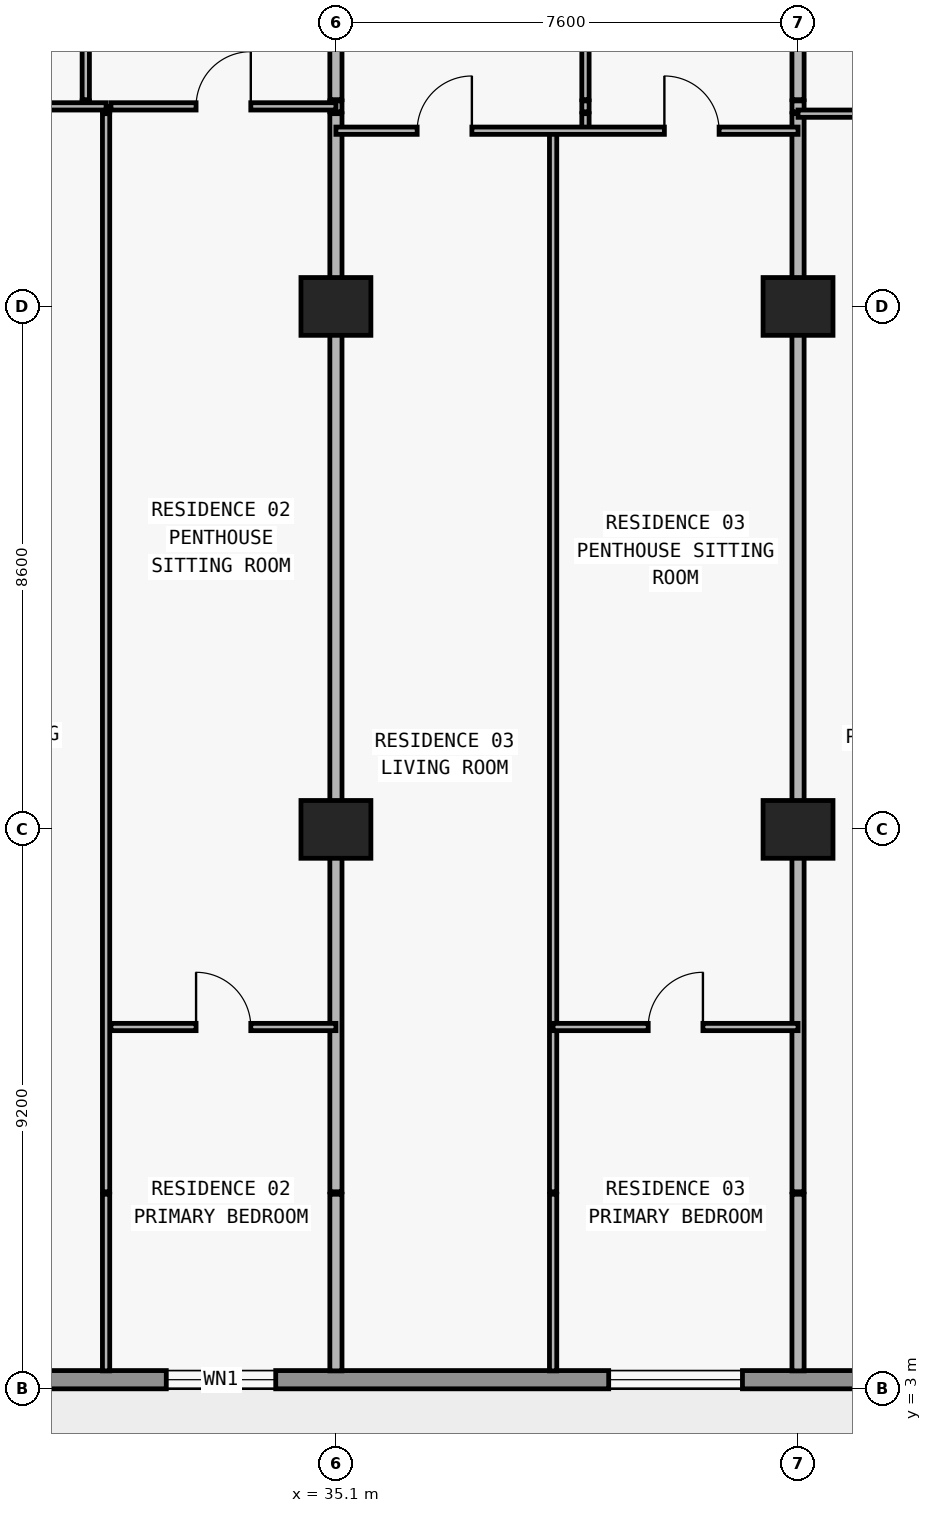
"""IFC4 building model, lengths in metres.
Left out: names, types, materials, properties, quantities, classifications, styles, units other than length and angle.
Written with IfcOpenShell. Run it as: python <this file> out.ifc"""

import sys

from ifc_helpers import new_model, si_unit, direction, frame, frame_2d, origin, origin_2d, place, context, subcontext, project, spatial, rectangle, extrude, element, fill, save


model = new_model("IFC4")
c1 = context("Model", 3, precision=1e-05, world=origin(), true_north=direction((0.0, 1.0)))
c2 = subcontext(c1, "Body", "Model", "MODEL_VIEW")
j1 = project(units=[si_unit("LENGTHUNIT", "METRE"), si_unit("PLANEANGLEUNIT", "RADIAN")], contexts=[c1])
p1 = place(None, origin())
s1 = spatial("IfcSite", under=j1, at=p1, CompositionType="ELEMENT")
p2 = place(p1, origin())
s2 = spatial("IfcBuilding", under=s1, at=p2, CompositionType="ELEMENT")
p3 = place(p2, frame((0.0, 0.0, 43.2)))
s3 = spatial("IfcBuildingStorey", under=s2, at=p3, CompositionType="ELEMENT", Elevation=43.2)
for number, where, z_axis, x_axis in (
    (1, (35.1, 12.2, 0.0), (0.0, 0.0, 1.0), (1.0, 0.0, 0.0)),
    (2, (42.7, 12.2, 0.0), (0.0, 0.0, 1.0), (1.0, 0.0, 0.0)),
    (3, (35.1, 20.8, 0.0), (0.0, 0.0, 1.0), (1.0, 0.0, 0.0)),
    (4, (42.7, 20.8, 0.0), (0.0, 0.0, 1.0), (1.0, 0.0, 0.0)),
):
    element("IfcColumn", number, at=place(p3, frame(where, z_axis=z_axis, x_axis=x_axis)), inside=s3, PredefinedType="COLUMN", context=c2, shape_type="SweptSolid", body=[
        extrude(rectangle(XDim=1.15, YDim=0.95, at=origin_2d()), origin(), (0.0, 0.0, 1.0), 3.05),
    ])
p4 = place(p3, frame((72.7, 3.15, 0.0), z_axis=(0.0, 0.0, 1.0), x_axis=(-1.0, 0.0, 0.0)))
e5 = element("IfcWall", 5, at=p4, inside=s3, PredefinedType="STANDARD", context=c2, shape_type="SweptSolid", body=[
    extrude(rectangle(XDim=67.6, YDim=0.3, at=frame_2d((33.8, 0.0))), origin(), (0.0, 0.0, 1.0), 3.05),
])
p5 = place(p4, frame((59.89, 0.0, 0.0)))
e6 = element("IfcOpeningElement", 6, at=p5, cuts=e5, PredefinedType="OPENING", context=c2, shape_type="SweptSolid", body=[
    extrude(rectangle(XDim=2.0, YDim=2.3, at=frame_2d((1.0, 1.15))), frame((0.0, 0.16, 0.0), z_axis=(0.0, -1.0, 0.0), x_axis=(1.0, 0.0, 0.0)), (0.0, 0.0, 1.0), 0.32),
])
p6 = place(p4, frame((55.21, 0.0, 0.65)))
e7 = element("IfcOpeningElement", 7, at=p6, cuts=e5, PredefinedType="OPENING", context=c2, shape_type="SweptSolid", body=[
    extrude(rectangle(XDim=2.6, YDim=1.85, at=frame_2d((1.3, 0.925))), frame((0.0, 0.16, 0.0), z_axis=(0.0, -1.0, 0.0), x_axis=(1.0, 0.0, 0.0)), (0.0, 0.0, 1.0), 0.32),
])
p7 = place(p4, frame((49.1, 0.0, 0.85)))
e8 = element("IfcOpeningElement", 8, at=p7, cuts=e5, PredefinedType="OPENING", context=c2, shape_type="SweptSolid", body=[
    extrude(rectangle(XDim=2.2, YDim=1.55, at=frame_2d((1.1, 0.775))), frame((0.0, 0.16, 0.0), z_axis=(0.0, -1.0, 0.0), x_axis=(1.0, 0.0, 0.0)), (0.0, 0.0, 1.0), 0.32),
])
p8 = place(p4, frame((42.69, 0.0, 0.0)))
e9 = element("IfcOpeningElement", 9, at=p8, cuts=e5, PredefinedType="OPENING", context=c2, shape_type="SweptSolid", body=[
    extrude(rectangle(XDim=2.0, YDim=2.3, at=frame_2d((1.0, 1.15))), frame((0.0, 0.16, 0.0), z_axis=(0.0, -1.0, 0.0), x_axis=(1.0, 0.0, 0.0)), (0.0, 0.0, 1.0), 0.32),
])
p9 = place(p4, frame((38.59, 0.0, 0.85)))
e10 = element("IfcOpeningElement", 10, at=p9, cuts=e5, PredefinedType="OPENING", context=c2, shape_type="SweptSolid", body=[
    extrude(rectangle(XDim=1.8, YDim=1.55, at=frame_2d((0.9, 0.775))), frame((0.0, 0.16, 0.0), z_axis=(0.0, -1.0, 0.0), x_axis=(1.0, 0.0, 0.0)), (0.0, 0.0, 1.0), 0.32),
])
p10 = place(p4, frame((30.914, 0.0, 0.85)))
e11 = element("IfcOpeningElement", 11, at=p10, cuts=e5, PredefinedType="OPENING", context=c2, shape_type="SweptSolid", body=[
    extrude(rectangle(XDim=2.2, YDim=1.55, at=frame_2d((1.1, 0.775))), frame((0.0, 0.16, 0.0), z_axis=(0.0, -1.0, 0.0), x_axis=(1.0, 0.0, 0.0)), (0.0, 0.0, 1.0), 0.32),
])
p11 = place(p4, frame((26.69, 0.0, 0.0)))
e12 = element("IfcOpeningElement", 12, at=p11, cuts=e5, PredefinedType="OPENING", context=c2, shape_type="SweptSolid", body=[
    extrude(rectangle(XDim=2.0, YDim=2.3, at=frame_2d((1.0, 1.15))), frame((0.0, 0.16, 0.0), z_axis=(0.0, -1.0, 0.0), x_axis=(1.0, 0.0, 0.0)), (0.0, 0.0, 1.0), 0.32),
])
p12 = place(p4, frame((22.59, 0.0, 0.85)))
e13 = element("IfcOpeningElement", 13, at=p12, cuts=e5, PredefinedType="OPENING", context=c2, shape_type="SweptSolid", body=[
    extrude(rectangle(XDim=1.8, YDim=1.55, at=frame_2d((0.9, 0.775))), frame((0.0, 0.16, 0.0), z_axis=(0.0, -1.0, 0.0), x_axis=(1.0, 0.0, 0.0)), (0.0, 0.0, 1.0), 0.32),
])
p13 = place(p4, frame((18.69, 0.0, 0.0)))
e14 = element("IfcOpeningElement", 14, at=p13, cuts=e5, PredefinedType="OPENING", context=c2, shape_type="SweptSolid", body=[
    extrude(rectangle(XDim=2.0, YDim=2.3, at=frame_2d((1.0, 1.15))), frame((0.0, 0.16, 0.0), z_axis=(0.0, -1.0, 0.0), x_axis=(1.0, 0.0, 0.0)), (0.0, 0.0, 1.0), 0.32),
])
p14 = place(p4, frame((14.01, 0.0, 0.65)))
e15 = element("IfcOpeningElement", 15, at=p14, cuts=e5, PredefinedType="OPENING", context=c2, shape_type="SweptSolid", body=[
    extrude(rectangle(XDim=2.6, YDim=1.85, at=frame_2d((1.3, 0.925))), frame((0.0, 0.16, 0.0), z_axis=(0.0, -1.0, 0.0), x_axis=(1.0, 0.0, 0.0)), (0.0, 0.0, 1.0), 0.32),
])
p15 = place(p4, frame((7.9, 0.0, 0.85)))
e16 = element("IfcOpeningElement", 16, at=p15, cuts=e5, PredefinedType="OPENING", context=c2, shape_type="SweptSolid", body=[
    extrude(rectangle(XDim=2.2, YDim=1.55, at=frame_2d((1.1, 0.775))), frame((0.0, 0.16, 0.0), z_axis=(0.0, -1.0, 0.0), x_axis=(1.0, 0.0, 0.0)), (0.0, 0.0, 1.0), 0.32),
])
p16 = place(p3, frame((30.986, 24.09, 0.0), z_axis=(0.0, 0.0, 1.0), x_axis=(0.0, 1.0, 0.0)))
e17 = element("IfcWall", 17, at=p16, inside=s3, PredefinedType="PARTITIONING", context=c2, shape_type="SweptSolid", body=[
    extrude(rectangle(XDim=0.09, YDim=0.12, at=frame_2d((0.045, 0.0))), origin(), (0.0, 0.0, 1.0), 3.05),
])
p17 = place(p3, frame((30.986, 24.2, 0.0), z_axis=(0.0, 0.0, 1.0), x_axis=(0.0, 1.0, 0.0)))
e18 = element("IfcWall", 18, at=p17, inside=s3, PredefinedType="PARTITIONING", context=c2, shape_type="SweptSolid", body=[
    extrude(rectangle(XDim=4.38, YDim=0.12, at=frame_2d((2.19, 0.0))), origin(), (0.0, 0.0, 1.0), 3.05),
])
p18 = place(p17, frame((1.74, 0.0, 0.0)))
e19 = element("IfcOpeningElement", 19, at=p18, cuts=e18, PredefinedType="OPENING", context=c2, shape_type="SweptSolid", body=[
    extrude(rectangle(XDim=0.9, YDim=2.15, at=frame_2d((0.45, 1.075))), frame((0.0, 0.07, 0.0), z_axis=(0.0, -1.0, 0.0), x_axis=(1.0, 0.0, 0.0)), (0.0, 0.0, 1.0), 0.14),
])
p19 = place(p3, frame((31.32, 3.295, 0.0), z_axis=(0.0, 0.0, 1.0), x_axis=(0.0, 1.0, 0.0)))
e20 = element("IfcWall", 20, at=p19, inside=s3, PredefinedType="PARTITIONING", context=c2, shape_type="SweptSolid", body=[
    extrude(rectangle(XDim=2.905, YDim=0.12, at=frame_2d((1.453, 0.0))), origin(), (0.0, 0.0, 1.0), 3.05),
])
p20 = place(p3, frame((31.32, 6.24, 0.0), z_axis=(0.0, 0.0, 1.0), x_axis=(0.0, 1.0, 0.0)))
e21 = element("IfcWall", 21, at=p20, inside=s3, PredefinedType="PARTITIONING", context=c2, shape_type="SweptSolid", body=[
    extrude(rectangle(XDim=17.73, YDim=0.12, at=frame_2d((8.865, 0.0))), origin(), (0.0, 0.0, 1.0), 3.05),
])
p21 = place(p3, frame((31.32, 24.0, 0.0), z_axis=(0.0, 0.0, 1.0), x_axis=(0.0, 1.0, 0.0)))
e22 = element("IfcWall", 22, at=p21, inside=s3, PredefinedType="PARTITIONING", context=c2, shape_type="SweptSolid", body=[
    extrude(rectangle(XDim=0.09, YDim=0.12, at=frame_2d((0.045, 0.0))), origin(), (0.0, 0.0, 1.0), 3.05),
])
p22 = place(p3, frame((35.1, 3.295, 0.0), z_axis=(0.0, 0.0, 1.0), x_axis=(0.0, 1.0, 0.0)))
e23 = element("IfcWall", 23, at=p22, inside=s3, PredefinedType="PARTITIONING", context=c2, shape_type="SweptSolid", body=[
    extrude(rectangle(XDim=2.905, YDim=0.2, at=frame_2d((1.453, 0.0))), origin(), (0.0, 0.0, 1.0), 3.05),
])
p23 = place(p3, frame((35.1, 6.24, 0.0), z_axis=(0.0, 0.0, 1.0), x_axis=(0.0, 1.0, 0.0)))
e24 = element("IfcWall", 24, at=p23, inside=s3, PredefinedType="PARTITIONING", context=c2, shape_type="SweptSolid", body=[
    extrude(rectangle(XDim=17.73, YDim=0.2, at=frame_2d((8.865, 0.0))), origin(), (0.0, 0.0, 1.0), 2.11),
])
p24 = place(p3, frame((35.1, 24.0, 0.0), z_axis=(0.0, 0.0, 1.0), x_axis=(0.0, 1.0, 0.0)))
e25 = element("IfcWall", 25, at=p24, inside=s3, PredefinedType="PARTITIONING", context=c2, shape_type="SweptSolid", body=[
    extrude(rectangle(XDim=0.18, YDim=0.2, at=frame_2d((0.09, 0.0))), origin(), (0.0, 0.0, 1.0), 2.11),
])
p25 = place(p3, frame((35.1, 24.2, 0.0), z_axis=(0.0, 0.0, 1.0), x_axis=(0.0, 1.0, 0.0)))
e26 = element("IfcWall", 26, at=p25, inside=s3, PredefinedType="PARTITIONING", context=c2, shape_type="SweptSolid", body=[
    extrude(rectangle(XDim=4.38, YDim=0.2, at=frame_2d((2.19, 0.0))), origin(), (0.0, 0.0, 1.0), 2.11),
])
p26 = place(p3, frame((38.672, 3.295, 0.0), z_axis=(0.0, 0.0, 1.0), x_axis=(0.0, 1.0, 0.0)))
e27 = element("IfcWall", 27, at=p26, inside=s3, PredefinedType="PARTITIONING", context=c2, shape_type="SweptSolid", body=[
    extrude(rectangle(XDim=2.905, YDim=0.12, at=frame_2d((1.453, 0.0))), origin(), (0.0, 0.0, 1.0), 3.05),
])
p27 = place(p3, frame((38.672, 6.24, 0.0), z_axis=(0.0, 0.0, 1.0), x_axis=(0.0, 1.0, 0.0)))
e28 = element("IfcWall", 28, at=p27, inside=s3, PredefinedType="PARTITIONING", context=c2, shape_type="SweptSolid", body=[
    extrude(rectangle(XDim=17.45, YDim=0.12, at=frame_2d((8.725, 0.0))), origin(), (0.0, 0.0, 1.0), 3.05),
])
p28 = place(p3, frame((39.204, 23.69, 0.0), z_axis=(0.0, 0.0, 1.0), x_axis=(0.0, 1.0, 0.0)))
e29 = element("IfcWall", 29, at=p28, inside=s3, PredefinedType="PARTITIONING", context=c2, shape_type="SweptSolid", body=[
    extrude(rectangle(XDim=0.28, YDim=0.12, at=frame_2d((0.14, 0.0))), origin(), (0.0, 0.0, 1.0), 3.05),
])
p29 = place(p3, frame((39.204, 24.0, 0.0), z_axis=(0.0, 0.0, 1.0), x_axis=(0.0, 1.0, 0.0)))
e30 = element("IfcWall", 30, at=p29, inside=s3, PredefinedType="PARTITIONING", context=c2, shape_type="SweptSolid", body=[
    extrude(rectangle(XDim=0.18, YDim=0.12, at=frame_2d((0.09, 0.0))), origin(), (0.0, 0.0, 1.0), 3.05),
])
p30 = place(p3, frame((39.204, 24.2, 0.0), z_axis=(0.0, 0.0, 1.0), x_axis=(0.0, 1.0, 0.0)))
e31 = element("IfcWall", 31, at=p30, inside=s3, PredefinedType="PARTITIONING", context=c2, shape_type="SweptSolid", body=[
    extrude(rectangle(XDim=4.38, YDim=0.12, at=frame_2d((2.19, 0.0))), origin(), (0.0, 0.0, 1.0), 3.05),
])
p31 = place(p30, frame((1.74, 0.0, 0.0)))
e32 = element("IfcOpeningElement", 32, at=p31, cuts=e31, PredefinedType="OPENING", context=c2, shape_type="SweptSolid", body=[
    extrude(rectangle(XDim=0.9, YDim=2.15, at=frame_2d((0.45, 1.075))), frame((0.0, 0.07, 0.0), z_axis=(0.0, -1.0, 0.0), x_axis=(1.0, 0.0, 0.0)), (0.0, 0.0, 1.0), 0.14),
])
p32 = place(p3, frame((42.7, 3.295, 0.0), z_axis=(0.0, 0.0, 1.0), x_axis=(0.0, 1.0, 0.0)))
e33 = element("IfcWall", 33, at=p32, inside=s3, PredefinedType="PARTITIONING", context=c2, shape_type="SweptSolid", body=[
    extrude(rectangle(XDim=2.905, YDim=0.2, at=frame_2d((1.453, 0.0))), origin(), (0.0, 0.0, 1.0), 3.05),
])
p33 = place(p3, frame((42.7, 6.24, 0.0), z_axis=(0.0, 0.0, 1.0), x_axis=(0.0, 1.0, 0.0)))
e34 = element("IfcWall", 34, at=p33, inside=s3, PredefinedType="PARTITIONING", context=c2, shape_type="SweptSolid", body=[
    extrude(rectangle(XDim=17.73, YDim=0.2, at=frame_2d((8.865, 0.0))), origin(), (0.0, 0.0, 1.0), 2.11),
])
p34 = place(p3, frame((42.7, 24.0, 0.0), z_axis=(0.0, 0.0, 1.0), x_axis=(0.0, 1.0, 0.0)))
e35 = element("IfcWall", 35, at=p34, inside=s3, PredefinedType="PARTITIONING", context=c2, shape_type="SweptSolid", body=[
    extrude(rectangle(XDim=0.18, YDim=0.2, at=frame_2d((0.09, 0.0))), origin(), (0.0, 0.0, 1.0), 2.11),
])
p35 = place(p3, frame((42.7, 24.2, 0.0), z_axis=(0.0, 0.0, 1.0), x_axis=(0.0, 1.0, 0.0)))
e36 = element("IfcWall", 36, at=p35, inside=s3, PredefinedType="PARTITIONING", context=c2, shape_type="SweptSolid", body=[
    extrude(rectangle(XDim=4.38, YDim=0.2, at=frame_2d((2.19, 0.0))), origin(), (0.0, 0.0, 1.0), 2.11),
])
p36 = place(p3, frame((31.4, 8.95, 0.0), z_axis=(0.0, 0.0, 1.0), x_axis=(1.0, 0.0, 0.0)))
e37 = element("IfcWall", 37, at=p36, inside=s3, PredefinedType="PARTITIONING", context=c2, shape_type="SweptSolid", body=[
    extrude(rectangle(XDim=3.7, YDim=0.12, at=frame_2d((1.85, 0.0))), origin(), (0.0, 0.0, 1.0), 3.05),
])
p37 = place(p36, frame((1.4, 0.0, 0.0)))
e38 = element("IfcOpeningElement", 38, at=p37, cuts=e37, PredefinedType="OPENING", context=c2, shape_type="SweptSolid", body=[
    extrude(rectangle(XDim=0.9, YDim=2.15, at=frame_2d((0.45, 1.075))), frame((0.0, 0.07, 0.0), z_axis=(0.0, -1.0, 0.0), x_axis=(1.0, 0.0, 0.0)), (0.0, 0.0, 1.0), 0.14),
])
p38 = place(p3, frame((38.672, 8.95, 0.0), z_axis=(0.0, 0.0, 1.0), x_axis=(1.0, 0.0, 0.0)))
e39 = element("IfcWall", 39, at=p38, inside=s3, PredefinedType="PARTITIONING", context=c2, shape_type="SweptSolid", body=[
    extrude(rectangle(XDim=4.028, YDim=0.12, at=frame_2d((2.014, 0.0))), origin(), (0.0, 0.0, 1.0), 3.05),
])
p39 = place(p38, frame((1.564, 0.0, 0.0)))
e40 = element("IfcOpeningElement", 40, at=p39, cuts=e39, PredefinedType="OPENING", context=c2, shape_type="SweptSolid", body=[
    extrude(rectangle(XDim=0.9, YDim=2.15, at=frame_2d((0.45, 1.075))), frame((0.0, 0.07, 0.0), z_axis=(0.0, -1.0, 0.0), x_axis=(1.0, 0.0, 0.0)), (0.0, 0.0, 1.0), 0.14),
])
p40 = place(p3, frame((35.1, 23.69, 0.0), z_axis=(0.0, 0.0, 1.0), x_axis=(1.0, 0.0, 0.0)))
e41 = element("IfcWall", 41, at=p40, inside=s3, PredefinedType="PARTITIONING", context=c2, shape_type="SweptSolid", body=[
    extrude(rectangle(XDim=7.6, YDim=0.12, at=frame_2d((3.8, 0.0))), origin(), (0.0, 0.0, 1.0), 3.05),
])
p41 = place(p40, frame((1.336, 0.0, 0.0)))
e42 = element("IfcOpeningElement", 42, at=p41, cuts=e41, PredefinedType="OPENING", context=c2, shape_type="SweptSolid", body=[
    extrude(rectangle(XDim=0.9, YDim=2.15, at=frame_2d((0.45, 1.075))), frame((0.0, 0.07, 0.0), z_axis=(0.0, -1.0, 0.0), x_axis=(1.0, 0.0, 0.0)), (0.0, 0.0, 1.0), 0.14),
])
p42 = place(p40, frame((5.402, 0.0, 0.0)))
e43 = element("IfcOpeningElement", 43, at=p42, cuts=e41, PredefinedType="OPENING", context=c2, shape_type="SweptSolid", body=[
    extrude(rectangle(XDim=0.9, YDim=2.15, at=frame_2d((0.45, 1.075))), frame((0.0, 0.07, 0.0), z_axis=(0.0, -1.0, 0.0), x_axis=(1.0, 0.0, 0.0)), (0.0, 0.0, 1.0), 0.14),
])
p43 = place(p3, frame((42.7, 23.97, 0.0), z_axis=(0.0, 0.0, 1.0), x_axis=(1.0, 0.0, 0.0)))
e44 = element("IfcWall", 44, at=p43, inside=s3, PredefinedType="PARTITIONING", context=c2, shape_type="SweptSolid", body=[
    extrude(rectangle(XDim=8.13, YDim=0.12, at=frame_2d((4.065, 0.0))), origin(), (0.0, 0.0, 1.0), 3.05),
])
p44 = place(p43, frame((1.86, 0.0, 0.0)))
e45 = element("IfcOpeningElement", 45, at=p44, cuts=e44, PredefinedType="OPENING", context=c2, shape_type="SweptSolid", body=[
    extrude(rectangle(XDim=0.9, YDim=2.15, at=frame_2d((0.45, 1.075))), frame((0.0, 0.07, 0.0), z_axis=(0.0, -1.0, 0.0), x_axis=(1.0, 0.0, 0.0)), (0.0, 0.0, 1.0), 0.14),
])
p45 = place(p43, frame((6.008, 0.0, 0.0)))
e46 = element("IfcOpeningElement", 46, at=p45, cuts=e44, PredefinedType="OPENING", context=c2, shape_type="SweptSolid", body=[
    extrude(rectangle(XDim=0.9, YDim=2.15, at=frame_2d((0.45, 1.075))), frame((0.0, 0.07, 0.0), z_axis=(0.0, -1.0, 0.0), x_axis=(1.0, 0.0, 0.0)), (0.0, 0.0, 1.0), 0.14),
])
p46 = place(p3, frame((26.97, 24.09, 0.0), z_axis=(0.0, 0.0, 1.0), x_axis=(1.0, 0.0, 0.0)))
e47 = element("IfcWall", 47, at=p46, inside=s3, PredefinedType="PARTITIONING", context=c2, shape_type="SweptSolid", body=[
    extrude(rectangle(XDim=4.35, YDim=0.12, at=frame_2d((2.175, 0.0))), origin(), (0.0, 0.0, 1.0), 3.05),
])
p47 = place(p46, frame((1.558, 0.0, 0.0)))
e48 = element("IfcOpeningElement", 48, at=p47, cuts=e47, PredefinedType="OPENING", context=c2, shape_type="SweptSolid", body=[
    extrude(rectangle(XDim=0.9, YDim=2.15, at=frame_2d((0.45, 1.075))), frame((0.0, 0.07, 0.0), z_axis=(0.0, -1.0, 0.0), x_axis=(1.0, 0.0, 0.0)), (0.0, 0.0, 1.0), 0.14),
])
p48 = place(p3, frame((31.4, 24.09, 0.0), z_axis=(0.0, 0.0, 1.0), x_axis=(1.0, 0.0, 0.0)))
e49 = element("IfcWall", 49, at=p48, inside=s3, PredefinedType="PARTITIONING", context=c2, shape_type="SweptSolid", body=[
    extrude(rectangle(XDim=3.7, YDim=0.12, at=frame_2d((1.85, 0.0))), origin(), (0.0, 0.0, 1.0), 3.05),
])
p49 = place(p48, frame((1.4, 0.0, 0.0)))
e50 = element("IfcOpeningElement", 50, at=p49, cuts=e49, PredefinedType="OPENING", context=c2, shape_type="SweptSolid", body=[
    extrude(rectangle(XDim=0.9, YDim=2.15, at=frame_2d((0.45, 1.075))), frame((0.0, 0.07, 0.0), z_axis=(0.0, -1.0, 0.0), x_axis=(1.0, 0.0, 0.0)), (0.0, 0.0, 1.0), 0.14),
])
p50 = place(p9, origin())
e51 = element("IfcWindow", 51, at=p50, inside=s3, PartitioningType="SINGLE_PANEL", PredefinedType="WINDOW", context=c2, shape_type="SweptSolid", body=[
    extrude(rectangle(XDim=1.8, YDim=1.55, at=frame_2d((0.9, 0.775))), frame((0.0, 0.03, 0.0), z_axis=(0.0, -1.0, 0.0), x_axis=(1.0, 0.0, 0.0)), (0.0, 0.0, 1.0), 0.06),
])
fill(e10, e51)
p51 = place(p10, origin())
e52 = element("IfcWindow", 52, at=p51, inside=s3, PartitioningType="SINGLE_PANEL", PredefinedType="WINDOW", context=c2, shape_type="SweptSolid", body=[
    extrude(rectangle(XDim=2.2, YDim=1.55, at=frame_2d((1.1, 0.775))), frame((0.0, 0.03, 0.0), z_axis=(0.0, -1.0, 0.0), x_axis=(1.0, 0.0, 0.0)), (0.0, 0.0, 1.0), 0.06),
])
fill(e11, e52)
p52 = place(p49, origin())
e53 = element("IfcDoor", 53, at=p52, inside=s3, OperationType="SINGLE_SWING_RIGHT", PredefinedType="DOOR", context=c2, shape_type="SweptSolid", body=[
    extrude(rectangle(XDim=0.9, YDim=2.15, at=frame_2d((0.45, 1.075))), frame((0.0, 0.025, 0.0), z_axis=(0.0, -1.0, 0.0), x_axis=(1.0, 0.0, 0.0)), (0.0, 0.0, 1.0), 0.05),
])
fill(e50, e53)
p53 = place(p37, origin())
e54 = element("IfcDoor", 54, at=p53, inside=s3, OperationType="SINGLE_SWING_LEFT", PredefinedType="DOOR", context=c2, shape_type="SweptSolid", body=[
    extrude(rectangle(XDim=0.9, YDim=2.15, at=frame_2d((0.45, 1.075))), frame((0.0, 0.025, 0.0), z_axis=(0.0, -1.0, 0.0), x_axis=(1.0, 0.0, 0.0)), (0.0, 0.0, 1.0), 0.05),
])
fill(e38, e54)
p54 = place(p41, origin())
e55 = element("IfcDoor", 55, at=p54, inside=s3, OperationType="SINGLE_SWING_RIGHT", PredefinedType="DOOR", context=c2, shape_type="SweptSolid", body=[
    extrude(rectangle(XDim=0.9, YDim=2.15, at=frame_2d((0.45, 1.075))), frame((0.0, 0.025, 0.0), z_axis=(0.0, -1.0, 0.0), x_axis=(1.0, 0.0, 0.0)), (0.0, 0.0, 1.0), 0.05),
])
fill(e42, e55)
p55 = place(p42, origin())
e56 = element("IfcDoor", 56, at=p55, inside=s3, OperationType="SINGLE_SWING_LEFT", PredefinedType="DOOR", context=c2, shape_type="SweptSolid", body=[
    extrude(rectangle(XDim=0.9, YDim=2.15, at=frame_2d((0.45, 1.075))), frame((0.0, 0.025, 0.0), z_axis=(0.0, -1.0, 0.0), x_axis=(1.0, 0.0, 0.0)), (0.0, 0.0, 1.0), 0.05),
])
fill(e43, e56)
p56 = place(p39, origin())
e57 = element("IfcDoor", 57, at=p56, inside=s3, OperationType="SINGLE_SWING_RIGHT", PredefinedType="DOOR", context=c2, shape_type="SweptSolid", body=[
    extrude(rectangle(XDim=0.9, YDim=2.15, at=frame_2d((0.45, 1.075))), frame((0.0, 0.025, 0.0), z_axis=(0.0, -1.0, 0.0), x_axis=(1.0, 0.0, 0.0)), (0.0, 0.0, 1.0), 0.05),
])
fill(e40, e57)
save(model, sys.argv[1])
